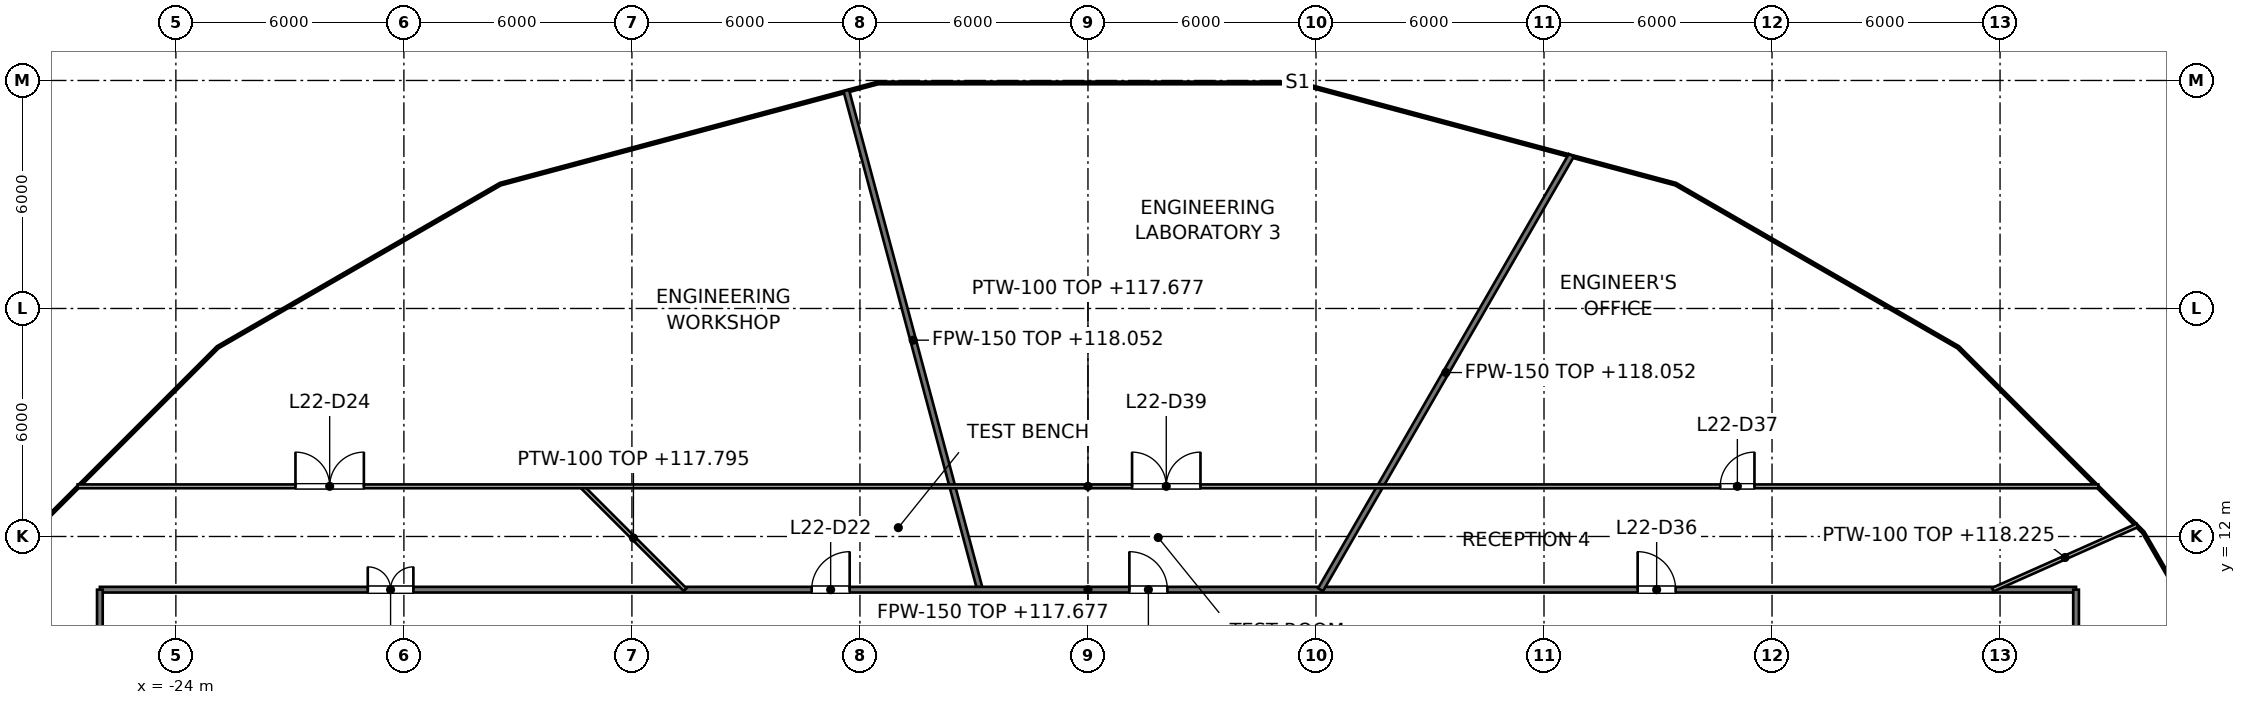
"""IFC4 building model, lengths in metres.
Left out: names, types, materials, properties, quantities, classifications, styles, units other than length and angle.
Written with IfcOpenShell. Run it as: python <this file> out.ifc"""

import sys

from ifc_helpers import new_model, si_unit, direction, frame, frame_2d, origin, place, context, subcontext, project, spatial, rectangle, extrude, element, fill, save


model = new_model("IFC4")
c1 = context("Model", 3, precision=1e-05, world=origin(), true_north=direction((0.0, 1.0)))
c2 = subcontext(c1, "Body", "Model", "MODEL_VIEW")
j1 = project(units=[si_unit("LENGTHUNIT", "METRE"), si_unit("PLANEANGLEUNIT", "RADIAN")], contexts=[c1])
p1 = place(None, origin())
s1 = spatial("IfcSite", under=j1, at=p1, CompositionType="ELEMENT")
p2 = place(p1, origin())
s2 = spatial("IfcBuilding", under=s1, at=p2, CompositionType="ELEMENT")
p3 = place(p2, frame((0.0, 0.0, 114.6)))
s3 = spatial("IfcBuildingStorey", under=s2, at=p3, CompositionType="ELEMENT", Elevation=114.6)
p4 = place(p3, frame((-6.359, 23.732, 0.0), z_axis=(0.0, 0.0, 1.0), x_axis=(0.258844995685, -0.965918872478, 0.0)))
e1 = element("IfcWall", 1, at=p4, inside=s3, PredefinedType="PARTITIONING", context=c2, shape_type="SweptSolid", body=[
    extrude(rectangle(XDim=13.595, YDim=0.15, at=frame_2d((6.798, 0.0))), origin(), (0.0, 0.0, 1.0), 3.452),
])
p5 = place(p3, frame((-26.0, 10.6, 0.0), z_axis=(0.0, 0.0, 1.0), x_axis=(1.0, 0.0, 0.0)))
e2 = element("IfcWall", 2, at=p5, inside=s3, PredefinedType="PARTITIONING", context=c2, shape_type="SweptSolid", body=[
    extrude(rectangle(XDim=52.0, YDim=0.15, at=frame_2d((26.0, 0.0))), origin(), (0.0, 0.0, 1.0), 3.077),
])
p6 = place(p5, frame((18.729, 0.0, 0.0)))
e3 = element("IfcOpeningElement", 3, at=p6, cuts=e2, PredefinedType="OPENING", context=c2, shape_type="SweptSolid", body=[
    extrude(rectangle(XDim=1.0, YDim=2.1, at=frame_2d((0.5, 1.05))), frame((0.0, 0.075, 0.0), z_axis=(0.0, -1.0, 0.0), x_axis=(1.0, 0.0, 0.0)), (0.0, 0.0, 1.0), 0.15),
])
p7 = place(p5, frame((7.05, 0.0, 0.0)))
e4 = element("IfcOpeningElement", 4, at=p7, cuts=e2, PredefinedType="OPENING", context=c2, shape_type="SweptSolid", body=[
    extrude(rectangle(XDim=1.2, YDim=2.1, at=frame_2d((0.6, 1.05))), frame((0.0, 0.075, 0.0), z_axis=(0.0, -1.0, 0.0), x_axis=(1.0, 0.0, 0.0)), (0.0, 0.0, 1.0), 0.15),
])
p8 = place(p5, frame((40.464, 0.0, 0.0)))
e5 = element("IfcOpeningElement", 5, at=p8, cuts=e2, PredefinedType="OPENING", context=c2, shape_type="SweptSolid", body=[
    extrude(rectangle(XDim=1.0, YDim=2.1, at=frame_2d((0.5, 1.05))), frame((0.0, 0.075, 0.0), z_axis=(0.0, -1.0, 0.0), x_axis=(1.0, 0.0, 0.0)), (0.0, 0.0, 1.0), 0.15),
])
p9 = place(p5, frame((27.09, 0.0, 0.0)))
e6 = element("IfcOpeningElement", 6, at=p9, cuts=e2, PredefinedType="OPENING", context=c2, shape_type="SweptSolid", body=[
    extrude(rectangle(XDim=1.0, YDim=2.1, at=frame_2d((0.5, 1.05))), frame((0.0, 0.075, 0.0), z_axis=(0.0, -1.0, 0.0), x_axis=(1.0, 0.0, 0.0)), (0.0, 0.0, 1.0), 0.15),
])
p10 = place(p3, frame((6.12, 10.6, 0.0), z_axis=(0.0, 0.0, 1.0), x_axis=(0.499961617088, 0.866047563035, 0.0)))
e7 = element("IfcWall", 7, at=p10, inside=s3, PredefinedType="PARTITIONING", context=c2, shape_type="SweptSolid", body=[
    extrude(rectangle(XDim=13.196, YDim=0.15, at=frame_2d((6.598, 0.0))), origin(), (0.0, 0.0, 1.0), 3.452),
])
for number, where, z_axis, x_axis in (
    (8, (26.0, 7.8, 0.0), (0.0, 0.0, 1.0), (0.0, 1.0, 0.0)),
    (9, (-26.0, 7.8, 0.0), (0.0, 0.0, 1.0), (0.0, 1.0, 0.0)),
):
    element("IfcWall", number, at=place(p3, frame(where, z_axis=z_axis, x_axis=x_axis)), inside=s3, PredefinedType="PARTITIONING", context=c2, shape_type="SweptSolid", body=[
        extrude(rectangle(XDim=2.8, YDim=0.15, at=frame_2d((1.4, 0.0))), origin(), (0.0, 0.0, 1.0), 3.276),
    ])
p11 = place(p3, frame((-13.32, 13.32, 0.0), z_axis=(0.0, 0.0, 1.0), x_axis=(0.707106781187, -0.707106781187, 0.0)))
e10 = element("IfcWall", 10, at=p11, inside=s3, PredefinedType="PARTITIONING", context=c2, shape_type="SweptSolid", body=[
    extrude(rectangle(XDim=3.847, YDim=0.1, at=frame_2d((1.923, 0.0))), origin(), (0.0, 0.0, 1.0), 3.195),
])
p12 = place(p3, frame((-26.586, 13.32, 0.0), z_axis=(0.0, 0.0, 1.0), x_axis=(1.0, 0.0, 0.0)))
e11 = element("IfcWall", 11, at=p12, inside=s3, PredefinedType="PARTITIONING", context=c2, shape_type="SweptSolid", body=[
    extrude(rectangle(XDim=53.172, YDim=0.1, at=frame_2d((26.586, 0.0))), origin(), (0.0, 0.0, 1.0), 3.077),
])
p13 = place(p12, frame((5.733, 0.0, 0.0)))
e12 = element("IfcOpeningElement", 12, at=p13, cuts=e11, PredefinedType="OPENING", context=c2, shape_type="SweptSolid", body=[
    extrude(rectangle(XDim=1.8, YDim=2.1, at=frame_2d((0.9, 1.05))), frame((0.0, 0.05, 0.0), z_axis=(0.0, -1.0, 0.0), x_axis=(1.0, 0.0, 0.0)), (0.0, 0.0, 1.0), 0.1),
])
p14 = place(p12, frame((43.224, 0.0, 0.0)))
e13 = element("IfcOpeningElement", 13, at=p14, cuts=e11, PredefinedType="OPENING", context=c2, shape_type="SweptSolid", body=[
    extrude(rectangle(XDim=0.9, YDim=2.1, at=frame_2d((0.45, 1.05))), frame((0.0, 0.05, 0.0), z_axis=(0.0, -1.0, 0.0), x_axis=(1.0, 0.0, 0.0)), (0.0, 0.0, 1.0), 0.1),
])
p15 = place(p12, frame((27.747, 0.0, 0.0)))
e14 = element("IfcOpeningElement", 14, at=p15, cuts=e11, PredefinedType="OPENING", context=c2, shape_type="SweptSolid", body=[
    extrude(rectangle(XDim=1.8, YDim=2.1, at=frame_2d((0.9, 1.05))), frame((0.0, 0.05, 0.0), z_axis=(0.0, -1.0, 0.0), x_axis=(1.0, 0.0, 0.0)), (0.0, 0.0, 1.0), 0.1),
])
p16 = place(p3, frame((23.808, 10.6, 0.0), z_axis=(0.0, 0.0, 1.0), x_axis=(0.913526027042, 0.406780282114, 0.0)))
e15 = element("IfcWall", 15, at=p16, inside=s3, PredefinedType="PARTITIONING", context=c2, shape_type="SweptSolid", body=[
    extrude(rectangle(XDim=4.164, YDim=0.1, at=frame_2d((2.082, 0.0))), origin(), (0.0, 0.0, 1.0), 3.625),
])
p17 = place(p6, origin())
e16 = element("IfcDoor", 16, at=p17, inside=s3, OperationType="SINGLE_SWING_RIGHT", PredefinedType="DOOR", context=c2, shape_type="SweptSolid", body=[
    extrude(rectangle(XDim=1.0, YDim=2.1, at=frame_2d((0.5, 1.05))), frame((0.0, 0.025, 0.0), z_axis=(0.0, -1.0, 0.0), x_axis=(1.0, 0.0, 0.0)), (0.0, 0.0, 1.0), 0.05),
])
fill(e3, e16)
p18 = place(p7, origin())
e17 = element("IfcDoor", 17, at=p18, inside=s3, OperationType="DOUBLE_DOOR_SINGLE_SWING", PredefinedType="DOOR", context=c2, shape_type="SweptSolid", body=[
    extrude(rectangle(XDim=1.2, YDim=2.1, at=frame_2d((0.6, 1.05))), frame((0.0, 0.025, 0.0), z_axis=(0.0, -1.0, 0.0), x_axis=(1.0, 0.0, 0.0)), (0.0, 0.0, 1.0), 0.05),
])
fill(e4, e17)
p19 = place(p13, origin())
e18 = element("IfcDoor", 18, at=p19, inside=s3, OperationType="DOUBLE_DOOR_SINGLE_SWING", PredefinedType="DOOR", context=c2, shape_type="SweptSolid", body=[
    extrude(rectangle(XDim=1.8, YDim=2.1, at=frame_2d((0.9, 1.05))), frame((0.0, 0.025, 0.0), z_axis=(0.0, -1.0, 0.0), x_axis=(1.0, 0.0, 0.0)), (0.0, 0.0, 1.0), 0.05),
])
fill(e12, e18)
p20 = place(p8, origin())
e19 = element("IfcDoor", 19, at=p20, inside=s3, OperationType="SINGLE_SWING_LEFT", PredefinedType="DOOR", context=c2, shape_type="SweptSolid", body=[
    extrude(rectangle(XDim=1.0, YDim=2.1, at=frame_2d((0.5, 1.05))), frame((0.0, 0.025, 0.0), z_axis=(0.0, -1.0, 0.0), x_axis=(1.0, 0.0, 0.0)), (0.0, 0.0, 1.0), 0.05),
])
fill(e5, e19)
p21 = place(p14, origin())
e20 = element("IfcDoor", 20, at=p21, inside=s3, OperationType="SINGLE_SWING_RIGHT", PredefinedType="DOOR", context=c2, shape_type="SweptSolid", body=[
    extrude(rectangle(XDim=0.9, YDim=2.1, at=frame_2d((0.45, 1.05))), frame((0.0, 0.025, 0.0), z_axis=(0.0, -1.0, 0.0), x_axis=(1.0, 0.0, 0.0)), (0.0, 0.0, 1.0), 0.05),
])
fill(e13, e20)
p22 = place(p9, origin())
e21 = element("IfcDoor", 21, at=p22, inside=s3, OperationType="SINGLE_SWING_LEFT", PredefinedType="DOOR", context=c2, shape_type="SweptSolid", body=[
    extrude(rectangle(XDim=1.0, YDim=2.1, at=frame_2d((0.5, 1.05))), frame((0.0, 0.025, 0.0), z_axis=(0.0, -1.0, 0.0), x_axis=(1.0, 0.0, 0.0)), (0.0, 0.0, 1.0), 0.05),
])
fill(e6, e21)
p23 = place(p15, origin())
e22 = element("IfcDoor", 22, at=p23, inside=s3, OperationType="DOUBLE_DOOR_SINGLE_SWING", PredefinedType="DOOR", context=c2, shape_type="SweptSolid", body=[
    extrude(rectangle(XDim=1.8, YDim=2.1, at=frame_2d((0.9, 1.05))), frame((0.0, 0.025, 0.0), z_axis=(0.0, -1.0, 0.0), x_axis=(1.0, 0.0, 0.0)), (0.0, 0.0, 1.0), 0.05),
])
fill(e14, e22)
save(model, sys.argv[1])
